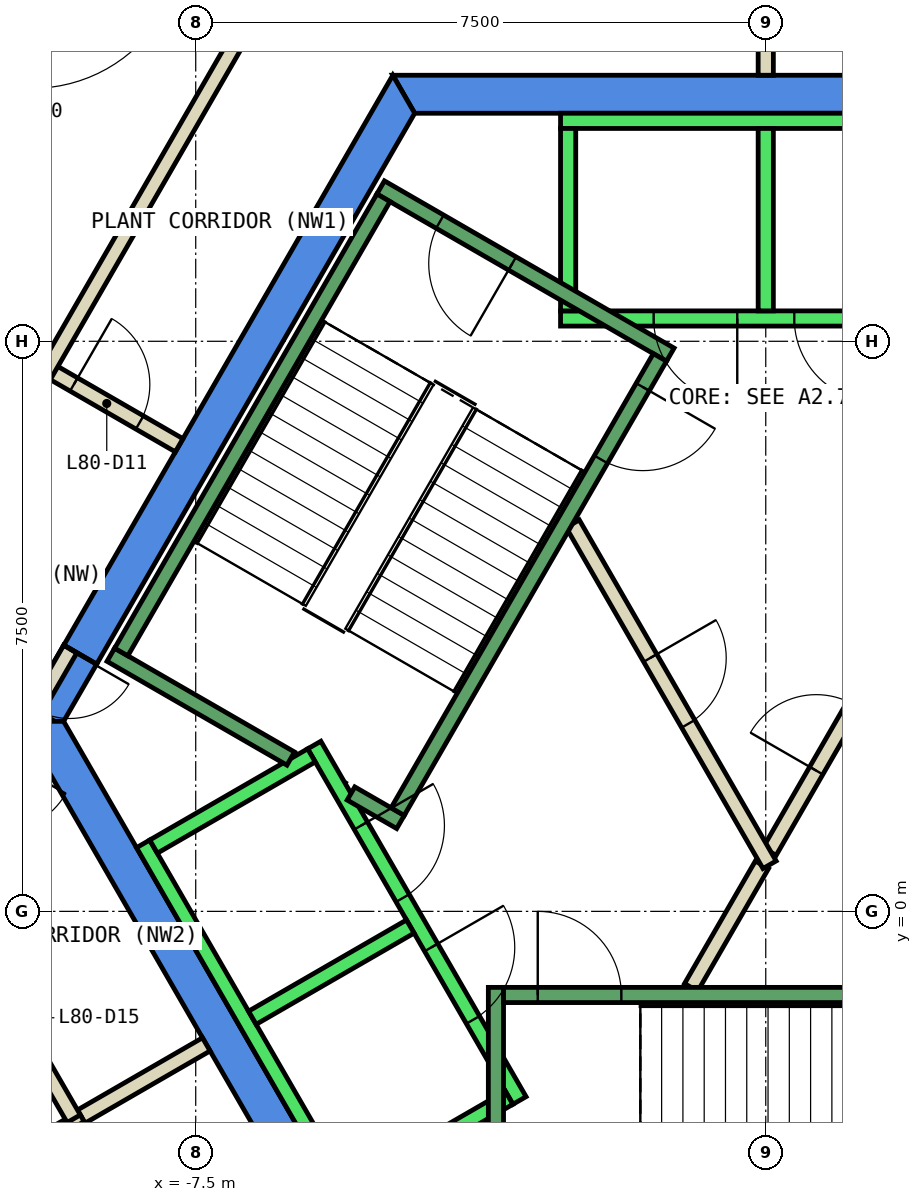
"""IFC4 building model, lengths in metres.
Left out: names, types, materials, properties, quantities, classifications, styles, units other than length and angle.
Written with IfcOpenShell. Run it as: python <this file> out.ifc"""

import sys

from ifc_helpers import new_model, si_unit, direction, frame, frame_2d, origin, place, context, subcontext, project, spatial, polyline, rectangle, outline, extrude, element, fill, save


model = new_model("IFC4")
c1 = context("Model", 3, precision=1e-05, world=origin(), true_north=direction((0.0, 1.0)))
c2 = subcontext(c1, "Body", "Model", "MODEL_VIEW")
j1 = project(units=[si_unit("LENGTHUNIT", "METRE"), si_unit("PLANEANGLEUNIT", "RADIAN")], contexts=[c1])
p1 = place(None, origin())
s1 = spatial("IfcSite", under=j1, at=p1, CompositionType="ELEMENT")
p2 = place(p1, origin())
s2 = spatial("IfcBuilding", under=s1, at=p2, CompositionType="ELEMENT")
p3 = place(p2, frame((0.0, 0.0, 340.4)))
s3 = spatial("IfcBuildingStorey", under=s2, at=p3, CompositionType="ELEMENT", Elevation=340.4)
p4 = place(p3, frame((0.0, 0.0, -0.45)))
e1 = element("IfcWall", 1, at=p4, inside=s3, PredefinedType="SHEAR", context=c2, shape_type="SweptSolid", body=[
    extrude(outline(polyline([(4.907, 11.0), (-4.907, 11.0), (-4.619, 10.5), (4.619, 10.5), (4.907, 11.0)])), origin(), (0.0, 0.0, 1.0), 4.6),
])
p5 = place(p3, frame((0.0, 0.0, -0.45)))
e2 = element("IfcWall", 2, at=p5, inside=s3, PredefinedType="SHEAR", context=c2, shape_type="SweptSolid", body=[
    extrude(outline(polyline([(-9.236, 3.502), (-8.803, 3.253), (-4.619, 10.5), (-4.907, 11.0), (-9.236, 3.502)])), origin(), (0.0, 0.0, 1.0), 4.6),
])
p6 = place(p3, frame((0.0, 0.0, 3.6)))
e3 = element("IfcWall", 3, at=p6, inside=s3, PredefinedType="SHEAR", context=c2, shape_type="SweptSolid", body=[
    extrude(outline(polyline([(-9.7, 2.7), (-9.354, 2.5), (-9.238, 2.5), (-8.803, 3.253), (-9.236, 3.502), (-9.7, 2.7)])), origin(), (0.0, 0.0, 1.0), 0.55),
])
p7 = place(p3, frame((0.0, 0.0, -0.45)))
e4 = element("IfcWall", 4, at=p7, inside=s3, PredefinedType="SHEAR", context=c2, shape_type="SweptSolid", body=[
    extrude(outline(polyline([(-9.815, 2.5), (-4.907, -6.0), (-4.619, -5.5), (-9.238, 2.5), (-9.815, 2.5)])), origin(), (0.0, 0.0, 1.0), 4.6),
])
p8 = place(p3, frame((-9.347, 13.339, 0.0), z_axis=(0.0, 0.0, 1.0), x_axis=(-0.510686403068, -0.859767060152, 0.0)))
e5 = element("IfcWall", 5, at=p8, inside=s3, PredefinedType="STANDARD", context=c2, shape_type="SweptSolid", body=[
    extrude(rectangle(XDim=6.38, YDim=0.3, at=frame_2d((3.19, 0.0))), origin(), (0.0, 0.0, 1.0), 4.15),
])
p9 = place(p8, frame((0.595, 0.0, 0.0)))
e6 = element("IfcOpeningElement", 6, at=p9, cuts=e5, PredefinedType="OPENING", context=c2, shape_type="SweptSolid", body=[
    extrude(rectangle(XDim=2.0, YDim=2.4, at=frame_2d((1.0, 1.2))), frame((0.0, 0.16, 0.0), z_axis=(0.0, -1.0, 0.0), x_axis=(1.0, 0.0, 0.0)), (0.0, 0.0, 1.0), 0.32),
])
p10 = place(p8, frame((3.785, 0.0, 0.9)))
e7 = element("IfcOpeningElement", 7, at=p10, cuts=e5, PredefinedType="OPENING", context=c2, shape_type="SweptSolid", body=[
    extrude(rectangle(XDim=2.0, YDim=3.0, at=frame_2d((1.0, 1.5))), frame((0.0, 0.16, 0.0), z_axis=(0.0, -1.0, 0.0), x_axis=(1.0, 0.0, 0.0)), (0.0, 0.0, 1.0), 0.32),
])
p11 = place(p3, frame((-0.982, -1.0, 0.0), z_axis=(0.0, 0.0, 1.0), x_axis=(0.50024047865, 0.865886518847, 0.0)))
e8 = element("IfcWall", 8, at=p11, inside=s3, PredefinedType="PARTITIONING", context=c2, shape_type="SweptSolid", body=[
    extrude(rectangle(XDim=1.863, YDim=0.2, at=frame_2d((0.931, 0.0))), origin(), (0.0, 0.0, 1.0), 4.15),
])
p12 = place(p3, frame((0.05, 0.787, 0.0), z_axis=(0.0, 0.0, 1.0), x_axis=(0.499954076797, 0.866051915934, 0.0)))
e9 = element("IfcWall", 9, at=p12, inside=s3, PredefinedType="PARTITIONING", context=c2, shape_type="SweptSolid", body=[
    extrude(rectangle(XDim=3.558, YDim=0.2, at=frame_2d((1.779, 0.0))), origin(), (0.0, 0.0, 1.0), 4.15),
])
p13 = place(p12, frame((1.229, 0.0, 0.0)))
e10 = element("IfcOpeningElement", 10, at=p13, cuts=e9, PredefinedType="OPENING", context=c2, shape_type="SweptSolid", body=[
    extrude(rectangle(XDim=1.0, YDim=2.1, at=frame_2d((0.5, 1.05))), frame((0.0, 0.11, 0.0), z_axis=(0.0, -1.0, 0.0), x_axis=(1.0, 0.0, 0.0)), (0.0, 0.0, 1.0), 0.22),
])
p14 = place(p3, frame((-2.54, 5.1, 0.0), z_axis=(0.0, 0.0, 1.0), x_axis=(0.499925051871, -0.866068670783, 0.0)))
e11 = element("IfcWall", 11, at=p14, inside=s3, PredefinedType="PARTITIONING", context=c2, shape_type="SweptSolid", body=[
    extrude(rectangle(XDim=5.181, YDim=0.2, at=frame_2d((2.59, 0.0))), origin(), (0.0, 0.0, 1.0), 4.15),
])
p15 = place(p14, frame((2.04, 0.0, 0.0)))
e12 = element("IfcOpeningElement", 12, at=p15, cuts=e11, PredefinedType="OPENING", context=c2, shape_type="SweptSolid", body=[
    extrude(rectangle(XDim=1.0, YDim=2.1, at=frame_2d((0.5, 1.05))), frame((0.0, 0.11, 0.0), z_axis=(0.0, -1.0, 0.0), x_axis=(1.0, 0.0, 0.0)), (0.0, 0.0, 1.0), 0.22),
])
p16 = place(p3, frame((-6.112, -7.913, 0.0), z_axis=(0.0, 0.0, 1.0), x_axis=(-0.499915430684, 0.866074224396, 0.0)))
e13 = element("IfcWall", 13, at=p16, inside=s3, PredefinedType="PARTITIONING", context=c2, shape_type="SweptSolid", body=[
    extrude(rectangle(XDim=5.987, YDim=0.2, at=frame_2d((2.993, 0.0))), origin(), (0.0, 0.0, 1.0), 4.15),
])
p17 = place(p3, frame((-9.006, -2.7, 0.0), z_axis=(0.0, 0.0, 1.0), x_axis=(0.865980106173, 0.500078449558, 0.0)))
e14 = element("IfcWall", 14, at=p17, inside=s3, PredefinedType="PARTITIONING", context=c2, shape_type="SweptSolid", body=[
    extrude(rectangle(XDim=1.9, YDim=0.2, at=frame_2d((0.95, 0.0))), origin(), (0.0, 0.0, 1.0), 4.15),
])
p18 = place(p3, frame((-19.664, -8.853, 0.0), z_axis=(0.0, 0.0, 1.0), x_axis=(0.866035935173, 0.499981758657, 0.0)))
e15 = element("IfcWall", 15, at=p18, inside=s3, PredefinedType="PARTITIONING", context=c2, shape_type="SweptSolid", body=[
    extrude(rectangle(XDim=12.307, YDim=0.15, at=frame_2d((6.153, 0.0))), origin(), (0.0, 0.0, 1.0), 4.15),
])
p19 = place(p3, frame((0.0, 11.0, 0.0), z_axis=(0.0, 0.0, 1.0), x_axis=(0.0, 1.0, 0.0)))
e16 = element("IfcWall", 16, at=p19, inside=s3, PredefinedType="PARTITIONING", context=c2, shape_type="SweptSolid", body=[
    extrude(rectangle(XDim=1.9, YDim=0.2, at=frame_2d((0.95, 0.0))), origin(), (0.0, 0.0, 1.0), 4.15),
])
p20 = place(p3, frame((-9.45, 7.132, 0.0), z_axis=(0.0, 0.0, 1.0), x_axis=(0.866010750942, -0.50002537861, 0.0)))
e17 = element("IfcWall", 17, at=p20, inside=s3, PredefinedType="PARTITIONING", context=c2, shape_type="SweptSolid", body=[
    extrude(rectangle(XDim=2.0, YDim=0.2, at=frame_2d((1.0, 0.0))), origin(), (0.0, 0.0, 1.0), 4.15),
])
p21 = place(p20, frame((0.4, 0.0, 0.0)))
e18 = element("IfcOpeningElement", 18, at=p21, cuts=e17, PredefinedType="OPENING", context=c2, shape_type="SweptSolid", body=[
    extrude(rectangle(XDim=1.0, YDim=2.1, at=frame_2d((0.5, 1.05))), frame((0.0, 0.11, 0.0), z_axis=(0.0, -1.0, 0.0), x_axis=(1.0, 0.0, 0.0)), (0.0, 0.0, 1.0), 0.22),
])
p22 = place(p3, frame((-9.5, 7.045, 0.0), z_axis=(0.0, 0.0, 1.0), x_axis=(0.499966812698, 0.866044563634, 0.0)))
e19 = element("IfcWall", 19, at=p22, inside=s3, PredefinedType="PARTITIONING", context=c2, shape_type="SweptSolid", body=[
    extrude(rectangle(XDim=6.977, YDim=0.2, at=frame_2d((3.488, 0.0))), origin(), (0.0, 0.0, 1.0), 4.15),
])
p23 = place(p22, frame((5.826, 0.0, 0.0)))
e20 = element("IfcOpeningElement", 20, at=p23, cuts=e19, PredefinedType="OPENING", context=c2, shape_type="SweptSolid", body=[
    extrude(rectangle(XDim=1.0, YDim=2.1, at=frame_2d((0.5, 1.05))), frame((0.0, 0.11, 0.0), z_axis=(0.0, -1.0, 0.0), x_axis=(1.0, 0.0, 0.0)), (0.0, 0.0, 1.0), 0.22),
])
p24 = place(p3, frame((-9.105, -2.728, 0.0), z_axis=(0.0, 0.0, 1.0), x_axis=(-0.500253029287, 0.865879267963, 0.0)))
e21 = element("IfcWall", 21, at=p24, inside=s3, PredefinedType="PARTITIONING", context=c2, shape_type="SweptSolid", body=[
    extrude(rectangle(XDim=2.814, YDim=0.2, at=frame_2d((1.407, 0.0))), origin(), (0.0, 0.0, 1.0), 4.15),
])
p25 = place(p24, frame((1.034, 0.0, 0.0)))
e22 = element("IfcOpeningElement", 22, at=p25, cuts=e21, PredefinedType="OPENING", context=c2, shape_type="SweptSolid", body=[
    extrude(rectangle(XDim=1.0, YDim=2.1, at=frame_2d((0.5, 1.05))), frame((0.0, 0.11, 0.0), z_axis=(0.0, -1.0, 0.0), x_axis=(1.0, 0.0, 0.0)), (0.0, 0.0, 1.0), 0.22),
])
p26 = place(p3, frame((-9.15, 3.452, 0.0), z_axis=(0.0, 0.0, 1.0), x_axis=(-0.500079945886, -0.865979242085, 0.0)))
e23 = element("IfcWall", 23, at=p26, inside=s3, PredefinedType="PARTITIONING", context=c2, shape_type="SweptSolid", body=[
    extrude(rectangle(XDim=0.926, YDim=0.2, at=frame_2d((0.463, 0.0))), origin(), (0.0, 0.0, 1.0), 2.4),
])
p27 = place(p26, frame((0.017, 0.0, 0.0)))
e24 = element("IfcOpeningElement", 24, at=p27, cuts=e23, PredefinedType="OPENING", context=c2, shape_type="SweptSolid", body=[
    extrude(rectangle(XDim=0.9, YDim=2.1, at=frame_2d((0.45, 1.05))), frame((0.0, 0.11, 0.0), z_axis=(0.0, -1.0, 0.0), x_axis=(1.0, 0.0, 0.0)), (0.0, 0.0, 1.0), 0.22),
])
p28 = place(p3, frame((2.7, 7.8, 0.0), z_axis=(0.0, 0.0, 1.0), x_axis=(-1.0, 0.0, 0.0)))
e25 = element("IfcWall", 25, at=p28, inside=s3, PredefinedType="STANDARD", context=c2, shape_type="SweptSolid", body=[
    extrude(rectangle(XDim=5.4, YDim=0.2, at=frame_2d((2.7, 0.0))), origin(), (0.0, 0.0, 1.0), 4.15),
])
p29 = place(p28, frame((1.225, 0.0, 0.0)))
e26 = element("IfcOpeningElement", 26, at=p29, cuts=e25, PredefinedType="OPENING", context=c2, shape_type="SweptSolid", body=[
    extrude(rectangle(XDim=1.1, YDim=2.1, at=frame_2d((0.55, 1.05))), frame((0.0, 0.11, 0.0), z_axis=(0.0, -1.0, 0.0), x_axis=(1.0, 0.0, 0.0)), (0.0, 0.0, 1.0), 0.22),
])
p30 = place(p28, frame((3.075, 0.0, 0.0)))
e27 = element("IfcOpeningElement", 27, at=p30, cuts=e25, PredefinedType="OPENING", context=c2, shape_type="SweptSolid", body=[
    extrude(rectangle(XDim=1.1, YDim=2.1, at=frame_2d((0.55, 1.05))), frame((0.0, 0.11, 0.0), z_axis=(0.0, -1.0, 0.0), x_axis=(1.0, 0.0, 0.0)), (0.0, 0.0, 1.0), 0.22),
])
p31 = place(p3, frame((2.7, 10.4, 0.0), z_axis=(0.0, 0.0, 1.0), x_axis=(-1.0, 0.0, 0.0)))
e28 = element("IfcWall", 28, at=p31, inside=s3, PredefinedType="STANDARD", context=c2, shape_type="SweptSolid", body=[
    extrude(rectangle(XDim=5.4, YDim=0.2, at=frame_2d((2.7, 0.0))), origin(), (0.0, 0.0, 1.0), 4.15),
])
for number, where, z_axis, x_axis in (
    (29, (0.0, 7.9, 0.0), (0.0, 0.0, 1.0), (0.0, 1.0, 0.0)),
    (30, (-2.6, 7.9, 0.0), (0.0, 0.0, 1.0), (0.0, 1.0, 0.0)),
):
    element("IfcWall", number, at=place(p3, frame(where, z_axis=z_axis, x_axis=x_axis)), inside=s3, PredefinedType="STANDARD", context=c2, shape_type="SweptSolid", body=[
        extrude(rectangle(XDim=2.4, YDim=0.2, at=frame_2d((1.2, 0.0))), origin(), (0.0, 0.0, 1.0), 4.15),
    ])
p32 = place(p3, frame((-5.94, 2.188, 0.0), z_axis=(0.0, 0.0, 1.0), x_axis=(0.500034260056, -0.866005622828, 0.0)))
e31 = element("IfcWall", 31, at=p32, inside=s3, PredefinedType="STANDARD", context=c2, shape_type="SweptSolid", body=[
    extrude(rectangle(XDim=5.399, YDim=0.2, at=frame_2d((2.7, 0.0))), origin(), (0.0, 0.0, 1.0), 4.15),
])
p33 = place(p32, frame((3.075, 0.0, 0.0)))
e32 = element("IfcOpeningElement", 32, at=p33, cuts=e31, PredefinedType="OPENING", context=c2, shape_type="SweptSolid", body=[
    extrude(rectangle(XDim=1.1, YDim=2.1, at=frame_2d((0.55, 1.05))), frame((0.0, 0.11, 0.0), z_axis=(0.0, -1.0, 0.0), x_axis=(1.0, 0.0, 0.0)), (0.0, 0.0, 1.0), 0.22),
])
p34 = place(p32, frame((1.225, 0.0, 0.0)))
e33 = element("IfcOpeningElement", 33, at=p34, cuts=e31, PredefinedType="OPENING", context=c2, shape_type="SweptSolid", body=[
    extrude(rectangle(XDim=1.1, YDim=2.1, at=frame_2d((0.55, 1.05))), frame((0.0, 0.11, 0.0), z_axis=(0.0, -1.0, 0.0), x_axis=(1.0, 0.0, 0.0)), (0.0, 0.0, 1.0), 0.22),
])
p35 = place(p3, frame((-8.192, 0.888, 0.0), z_axis=(0.0, 0.0, 1.0), x_axis=(0.500034260056, -0.866005622828, 0.0)))
e34 = element("IfcWall", 34, at=p35, inside=s3, PredefinedType="STANDARD", context=c2, shape_type="SweptSolid", body=[
    extrude(rectangle(XDim=5.399, YDim=0.2, at=frame_2d((2.7, 0.0))), origin(), (0.0, 0.0, 1.0), 4.15),
])
for number, where, z_axis, x_axis in (
    (35, (-5.977, 2.052, 0.0), (0.0, 0.0, 1.0), (-0.866, -0.5, 0.0)),
    (36, (-4.677, -0.2, 0.0), (0.0, 0.0, 1.0), (-0.866, -0.5, 0.0)),
):
    element("IfcWall", number, at=place(p3, frame(where, z_axis=z_axis, x_axis=x_axis)), inside=s3, PredefinedType="STANDARD", context=c2, shape_type="SweptSolid", body=[
        extrude(rectangle(XDim=2.399, YDim=0.2, at=frame_2d((1.2, 0.0))), origin(), (0.0, 0.0, 1.0), 4.15),
    ])
p36 = place(p3, frame((-3.377, -2.452, 0.0), z_axis=(0.0, 0.0, 1.0), x_axis=(-0.865955154139, -0.50012165622, 0.0)))
e37 = element("IfcWall", 37, at=p36, inside=s3, PredefinedType="STANDARD", context=c2, shape_type="SweptSolid", body=[
    extrude(rectangle(XDim=2.4, YDim=0.2, at=frame_2d((1.2, 0.0))), origin(), (0.0, 0.0, 1.0), 4.15),
])
p37 = place(p3, frame((-3.55, -1.0, 0.0), z_axis=(0.0, 0.0, 1.0), x_axis=(0.0, -1.0, 0.0)))
e38 = element("IfcWall", 38, at=p37, inside=s3, PredefinedType="STANDARD", context=c2, shape_type="SweptSolid", body=[
    extrude(rectangle(XDim=4.4, YDim=0.2, at=frame_2d((2.2, 0.0))), origin(), (0.0, 0.0, 1.0), 4.15),
])
p38 = place(p37, frame((2.4, 0.0, 0.0)))
e39 = element("IfcOpeningElement", 39, at=p38, cuts=e38, PredefinedType="OPENING", context=c2, shape_type="SweptSolid", body=[
    extrude(rectangle(XDim=1.1, YDim=2.2, at=frame_2d((0.55, 1.1))), frame((0.0, 0.11, 0.0), z_axis=(0.0, -1.0, 0.0), x_axis=(1.0, 0.0, 0.0)), (0.0, 0.0, 1.0), 0.22),
])
p39 = place(p3, frame((-3.45, -1.1, 0.0), z_axis=(0.0, 0.0, 1.0), x_axis=(1.0, 0.0, 0.0)))
e40 = element("IfcWall", 40, at=p39, inside=s3, PredefinedType="STANDARD", context=c2, shape_type="SweptSolid", body=[
    extrude(rectangle(XDim=6.9, YDim=0.2, at=frame_2d((3.45, 0.0))), origin(), (0.0, 0.0, 1.0), 4.15),
])
p40 = place(p39, frame((0.45, 0.0, 0.0)))
e41 = element("IfcOpeningElement", 41, at=p40, cuts=e40, PredefinedType="OPENING", context=c2, shape_type="SweptSolid", body=[
    extrude(rectangle(XDim=1.1, YDim=2.2, at=frame_2d((0.55, 1.1))), frame((0.0, 0.11, 0.0), z_axis=(0.0, -1.0, 0.0), x_axis=(1.0, 0.0, 0.0)), (0.0, 0.0, 1.0), 0.22),
])
p41 = place(p3, frame((-1.256, 7.324, 0.0), z_axis=(0.0, 0.0, 1.0), x_axis=(-0.866046073146, 0.499964197906, 0.0)))
e42 = element("IfcWall", 42, at=p41, inside=s3, PredefinedType="STANDARD", context=c2, shape_type="SweptSolid", body=[
    extrude(rectangle(XDim=4.4, YDim=0.2, at=frame_2d((2.2, 0.0))), origin(), (0.0, 0.0, 1.0), 4.15),
])
p42 = place(p41, frame((2.4, 0.0, 0.0)))
e43 = element("IfcOpeningElement", 43, at=p42, cuts=e42, PredefinedType="OPENING", context=c2, shape_type="SweptSolid", body=[
    extrude(rectangle(XDim=1.1, YDim=2.2, at=frame_2d((0.55, 1.1))), frame((0.0, 0.11, 0.0), z_axis=(0.0, -1.0, 0.0), x_axis=(1.0, 0.0, 0.0)), (0.0, 0.0, 1.0), 0.22),
])
p43 = place(p3, frame((-6.25, 2.01, 0.0), z_axis=(0.0, 0.0, 1.0), x_axis=(-0.86611865017, 0.499838457731, 0.0)))
e44 = element("IfcWall", 44, at=p43, inside=s3, PredefinedType="STANDARD", context=c2, shape_type="SweptSolid", body=[
    extrude(rectangle(XDim=2.733, YDim=0.2, at=frame_2d((1.366, 0.0))), origin(), (0.0, 0.0, 1.0), 4.15),
])
p44 = place(p3, frame((-4.806, 1.176, 0.0), z_axis=(0.0, 0.0, 1.0), x_axis=(-0.866558586415, 0.499075361355, 0.0)))
e45 = element("IfcWall", 45, at=p44, inside=s3, PredefinedType="STANDARD", context=c2, shape_type="SweptSolid", body=[
    extrude(rectangle(XDim=0.751, YDim=0.2, at=frame_2d((0.376, 0.0))), origin(), (0.0, 0.0, 1.0), 4.15),
])
p45 = place(p3, frame((-1.393, 7.288, 0.0), z_axis=(0.0, 0.0, 1.0), x_axis=(-0.499963383562, -0.866046543262, 0.0)))
e46 = element("IfcWall", 46, at=p45, inside=s3, PredefinedType="STANDARD", context=c2, shape_type="SweptSolid", body=[
    extrude(rectangle(XDim=6.9, YDim=0.2, at=frame_2d((3.45, 0.0))), origin(), (0.0, 0.0, 1.0), 4.15),
])
p46 = place(p45, frame((0.45, 0.0, 0.0)))
e47 = element("IfcOpeningElement", 47, at=p46, cuts=e46, PredefinedType="OPENING", context=c2, shape_type="SweptSolid", body=[
    extrude(rectangle(XDim=1.1, YDim=2.2, at=frame_2d((0.55, 1.1))), frame((0.0, 0.11, 0.0), z_axis=(0.0, -1.0, 0.0), x_axis=(1.0, 0.0, 0.0)), (0.0, 0.0, 1.0), 0.22),
])
p47 = place(p3, frame((-5.03, 9.388, 0.0), z_axis=(0.0, 0.0, 1.0), x_axis=(-0.499978703459, -0.866037698999, 0.0)))
e48 = element("IfcWall", 48, at=p47, inside=s3, PredefinedType="STANDARD", context=c2, shape_type="SweptSolid", body=[
    extrude(rectangle(XDim=6.9, YDim=0.2, at=frame_2d((3.45, 0.0))), origin(), (0.0, 0.0, 1.0), 4.15),
])
p48 = place(p21, origin())
e49 = element("IfcDoor", 49, at=p48, inside=s3, OperationType="SINGLE_SWING_LEFT", PredefinedType="DOOR", context=c2, shape_type="SweptSolid", body=[
    extrude(rectangle(XDim=1.0, YDim=2.1, at=frame_2d((0.5, 1.05))), frame((0.0, 0.025, 0.0), z_axis=(0.0, -1.0, 0.0), x_axis=(1.0, 0.0, 0.0)), (0.0, 0.0, 1.0), 0.05),
])
fill(e18, e49)
p49 = place(p13, origin())
e50 = element("IfcDoor", 50, at=p49, inside=s3, OperationType="SINGLE_SWING_RIGHT", PredefinedType="DOOR", context=c2, shape_type="SweptSolid", body=[
    extrude(rectangle(XDim=1.0, YDim=2.1, at=frame_2d((0.5, 1.05))), frame((0.0, 0.025, 0.0), z_axis=(0.0, -1.0, 0.0), x_axis=(1.0, 0.0, 0.0)), (0.0, 0.0, 1.0), 0.05),
])
fill(e10, e50)
p50 = place(p15, origin())
e51 = element("IfcDoor", 51, at=p50, inside=s3, OperationType="SINGLE_SWING_RIGHT", PredefinedType="DOOR", context=c2, shape_type="SweptSolid", body=[
    extrude(rectangle(XDim=1.0, YDim=2.1, at=frame_2d((0.5, 1.05))), frame((0.0, 0.025, 0.0), z_axis=(0.0, -1.0, 0.0), x_axis=(1.0, 0.0, 0.0)), (0.0, 0.0, 1.0), 0.05),
])
fill(e12, e51)
p51 = place(p27, origin())
e52 = element("IfcDoor", 52, at=p51, inside=s3, OperationType="SINGLE_SWING_LEFT", PredefinedType="DOOR", context=c2, shape_type="SweptSolid", body=[
    extrude(rectangle(XDim=0.9, YDim=2.1, at=frame_2d((0.45, 1.05))), frame((0.0, 0.025, 0.0), z_axis=(0.0, -1.0, 0.0), x_axis=(1.0, 0.0, 0.0)), (0.0, 0.0, 1.0), 0.05),
])
fill(e24, e52)
p52 = place(p29, origin())
e53 = element("IfcDoor", 53, at=p52, inside=s3, OperationType="SLIDING_TO_LEFT", PredefinedType="DOOR", context=c2, shape_type="SweptSolid", body=[
    extrude(rectangle(XDim=1.1, YDim=2.1, at=frame_2d((0.55, 1.05))), frame((0.0, 0.025, 0.0), z_axis=(0.0, -1.0, 0.0), x_axis=(1.0, 0.0, 0.0)), (0.0, 0.0, 1.0), 0.05),
])
fill(e26, e53)
p53 = place(p30, origin())
e54 = element("IfcDoor", 54, at=p53, inside=s3, OperationType="SLIDING_TO_LEFT", PredefinedType="DOOR", context=c2, shape_type="SweptSolid", body=[
    extrude(rectangle(XDim=1.1, YDim=2.1, at=frame_2d((0.55, 1.05))), frame((0.0, 0.025, 0.0), z_axis=(0.0, -1.0, 0.0), x_axis=(1.0, 0.0, 0.0)), (0.0, 0.0, 1.0), 0.05),
])
fill(e27, e54)
p54 = place(p33, origin())
e55 = element("IfcDoor", 55, at=p54, inside=s3, OperationType="SLIDING_TO_LEFT", PredefinedType="DOOR", context=c2, shape_type="SweptSolid", body=[
    extrude(rectangle(XDim=1.1, YDim=2.1, at=frame_2d((0.55, 1.05))), frame((0.0, 0.025, 0.0), z_axis=(0.0, -1.0, 0.0), x_axis=(1.0, 0.0, 0.0)), (0.0, 0.0, 1.0), 0.05),
])
fill(e32, e55)
p55 = place(p34, origin())
e56 = element("IfcDoor", 56, at=p55, inside=s3, OperationType="SLIDING_TO_LEFT", PredefinedType="DOOR", context=c2, shape_type="SweptSolid", body=[
    extrude(rectangle(XDim=1.1, YDim=2.1, at=frame_2d((0.55, 1.05))), frame((0.0, 0.025, 0.0), z_axis=(0.0, -1.0, 0.0), x_axis=(1.0, 0.0, 0.0)), (0.0, 0.0, 1.0), 0.05),
])
fill(e33, e56)
p56 = place(p40, origin())
e57 = element("IfcDoor", 57, at=p56, inside=s3, OperationType="SINGLE_SWING_LEFT", PredefinedType="DOOR", context=c2, shape_type="SweptSolid", body=[
    extrude(rectangle(XDim=1.1, YDim=2.2, at=frame_2d((0.55, 1.1))), frame((0.0, 0.025, 0.0), z_axis=(0.0, -1.0, 0.0), x_axis=(1.0, 0.0, 0.0)), (0.0, 0.0, 1.0), 0.05),
])
fill(e41, e57)
p57 = place(p46, origin())
e58 = element("IfcDoor", 58, at=p57, inside=s3, OperationType="SINGLE_SWING_LEFT", PredefinedType="DOOR", context=c2, shape_type="SweptSolid", body=[
    extrude(rectangle(XDim=1.1, YDim=2.2, at=frame_2d((0.55, 1.1))), frame((0.0, 0.025, 0.0), z_axis=(0.0, -1.0, 0.0), x_axis=(1.0, 0.0, 0.0)), (0.0, 0.0, 1.0), 0.05),
])
fill(e47, e58)
p58 = place(p42, origin())
e59 = element("IfcDoor", 59, at=p58, inside=s3, OperationType="SINGLE_SWING_LEFT", PredefinedType="DOOR", context=c2, shape_type="SweptSolid", body=[
    extrude(rectangle(XDim=1.1, YDim=2.2, at=frame_2d((0.55, 1.1))), frame((0.0, 0.025, 0.0), z_axis=(0.0, -1.0, 0.0), x_axis=(1.0, 0.0, 0.0)), (0.0, 0.0, 1.0), 0.05),
])
fill(e43, e59)
save(model, sys.argv[1])
